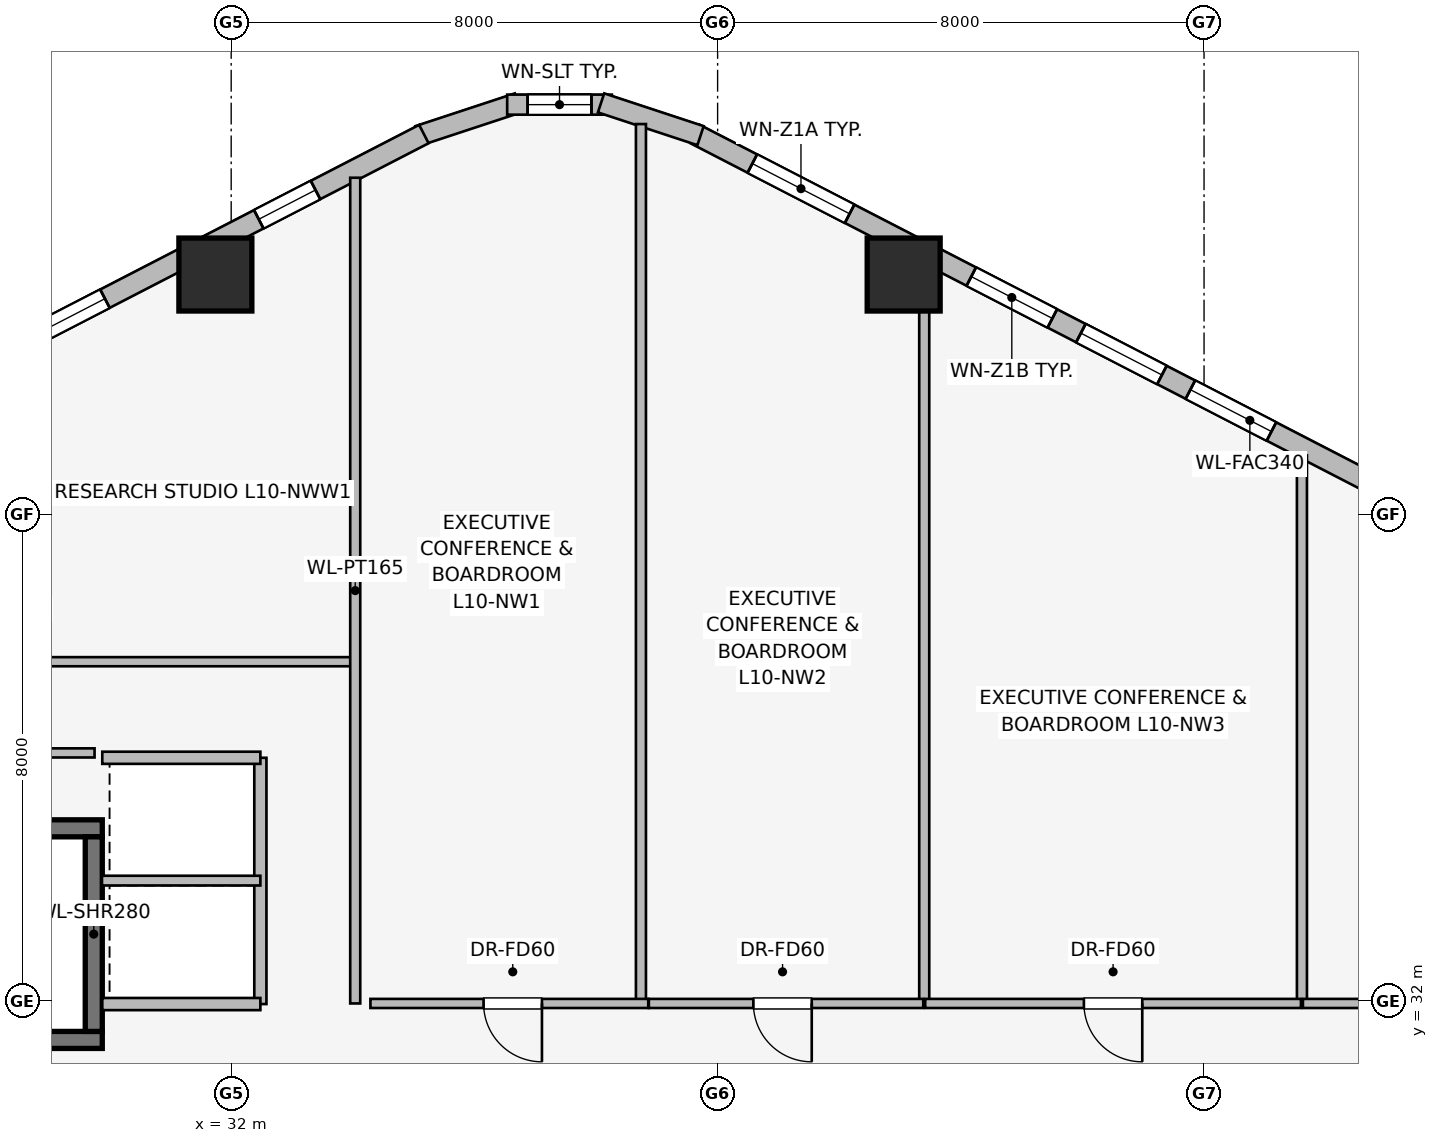
"""IFC4 building model, lengths in metres.
Left out: names, types, materials, properties, quantities, classifications, styles, units other than length and angle.
Written with IfcOpenShell. Run it as: python <this file> out.ifc"""

import sys

from ifc_helpers import new_model, si_unit, direction, frame, frame_2d, origin, origin_2d, place, context, subcontext, project, spatial, rectangle, extrude, element, fill, save


model = new_model("IFC4")
c1 = context("Model", 3, precision=1e-05, world=origin(), true_north=direction((0.0, 1.0)))
c2 = subcontext(c1, "Body", "Model", "MODEL_VIEW")
j1 = project(units=[si_unit("LENGTHUNIT", "METRE"), si_unit("PLANEANGLEUNIT", "RADIAN")], contexts=[c1])
p1 = place(None, origin())
s1 = spatial("IfcSite", under=j1, at=p1, CompositionType="ELEMENT")
p2 = place(p1, origin())
s2 = spatial("IfcBuilding", under=s1, at=p2, CompositionType="ELEMENT")
p3 = place(p2, frame((0.0, 0.0, 41.6)))
s3 = spatial("IfcBuildingStorey", under=s2, at=p3, CompositionType="ELEMENT", Elevation=41.6)
p4 = place(p3, frame((21.52, 31.36, 0.0), z_axis=(0.0, 0.0, 1.0), x_axis=(1.0, 0.0, 0.0)))
e1 = element("IfcWall", 1, at=p4, inside=s3, PredefinedType="SHEAR", context=c2, shape_type="SweptSolid", body=[
    extrude(rectangle(XDim=8.36, YDim=0.28, at=frame_2d((4.18, 0.0))), origin(), (0.0, 0.0, 1.0), 3.65),
])
p5 = place(p4, frame((0.45, 0.0, 0.0)))
e2 = element("IfcOpeningElement", 2, at=p5, cuts=e1, PredefinedType="OPENING", context=c2, shape_type="SweptSolid", body=[
    extrude(rectangle(XDim=1.05, YDim=2.0, at=frame_2d((0.525, 1.0))), frame((0.0, 0.15, 0.0), z_axis=(0.0, -1.0, 0.0), x_axis=(1.0, 0.0, 0.0)), (0.0, 0.0, 1.0), 0.3),
])
p6 = place(p3, frame((29.88, 34.84, 0.0), z_axis=(0.0, 0.0, 1.0), x_axis=(-1.0, 0.0, 0.0)))
e3 = element("IfcWall", 3, at=p6, inside=s3, PredefinedType="SHEAR", context=c2, shape_type="SweptSolid", body=[
    extrude(rectangle(XDim=8.36, YDim=0.28, at=frame_2d((4.18, 0.0))), origin(), (0.0, 0.0, 1.0), 3.65),
])
p7 = place(p3, frame((29.74, 31.5, 0.0), z_axis=(0.0, 0.0, 1.0), x_axis=(0.0, 1.0, 0.0)))
e4 = element("IfcWall", 4, at=p7, inside=s3, PredefinedType="SHEAR", context=c2, shape_type="SweptSolid", body=[
    extrude(rectangle(XDim=3.2, YDim=0.28, at=frame_2d((1.6, 0.0))), origin(), (0.0, 0.0, 1.0), 3.65),
])
for number, where, z_axis, x_axis in (
    (5, (43.06, 43.947, 0.0), (0.0, 0.0, 1.0), (1.0, 0.0, 0.0)),
    (6, (31.74, 43.947, 0.0), (0.0, 0.0, 1.0), (1.0, 0.0, 0.0)),
):
    element("IfcColumn", number, at=place(p3, frame(where, z_axis=z_axis, x_axis=x_axis)), inside=s3, PredefinedType="COLUMN", context=c2, shape_type="SweptSolid", body=[
        extrude(rectangle(XDim=1.2, YDim=1.2, at=origin_2d()), origin(), (0.0, 0.0, 1.0), 3.65),
    ])
p8 = place(p3, frame((39.631, 46.257, 0.0), z_axis=(0.0, 0.0, 1.0), x_axis=(0.888634413993, -0.458616264721, 0.0)))
e7 = element("IfcWall", 7, at=p8, inside=s3, PredefinedType="STANDARD", context=c2, shape_type="SweptSolid", body=[
    extrude(rectangle(XDim=20.531, YDim=0.34, at=frame_2d((10.266, 0.0))), origin(), (0.0, 0.0, 1.0), 2.684),
])
p9 = place(p8, frame((1.058, 0.0, 0.75)))
e8 = element("IfcOpeningElement", 8, at=p9, cuts=e7, PredefinedType="OPENING", context=c2, shape_type="SweptSolid", body=[
    extrude(rectangle(XDim=1.8, YDim=1.5, at=frame_2d((0.9, 0.75))), frame((0.0, 0.18, 0.0), z_axis=(0.0, -1.0, 0.0), x_axis=(1.0, 0.0, 0.0)), (0.0, 0.0, 1.0), 0.36),
])
p10 = place(p8, frame((5.11, 0.0, 0.75)))
e9 = element("IfcOpeningElement", 9, at=p10, cuts=e7, PredefinedType="OPENING", context=c2, shape_type="SweptSolid", body=[
    extrude(rectangle(XDim=1.5, YDim=1.5, at=frame_2d((0.75, 0.75))), frame((0.0, 0.18, 0.0), z_axis=(0.0, -1.0, 0.0), x_axis=(1.0, 0.0, 0.0)), (0.0, 0.0, 1.0), 0.36),
])
p11 = place(p8, frame((7.138, 0.0, 0.75)))
e10 = element("IfcOpeningElement", 10, at=p11, cuts=e7, PredefinedType="OPENING", context=c2, shape_type="SweptSolid", body=[
    extrude(rectangle(XDim=1.5, YDim=1.5, at=frame_2d((0.75, 0.75))), frame((0.0, 0.18, 0.0), z_axis=(0.0, -1.0, 0.0), x_axis=(1.0, 0.0, 0.0)), (0.0, 0.0, 1.0), 0.36),
])
p12 = place(p8, frame((9.165, 0.0, 0.75)))
e11 = element("IfcOpeningElement", 11, at=p12, cuts=e7, PredefinedType="OPENING", context=c2, shape_type="SweptSolid", body=[
    extrude(rectangle(XDim=1.5, YDim=1.5, at=frame_2d((0.75, 0.75))), frame((0.0, 0.18, 0.0), z_axis=(0.0, -1.0, 0.0), x_axis=(1.0, 0.0, 0.0)), (0.0, 0.0, 1.0), 0.36),
])
p13 = place(p8, frame((12.77, 0.0, 0.75)))
e12 = element("IfcOpeningElement", 12, at=p13, cuts=e7, PredefinedType="OPENING", context=c2, shape_type="SweptSolid", body=[
    extrude(rectangle(XDim=1.8, YDim=1.5, at=frame_2d((0.9, 0.75))), frame((0.0, 0.18, 0.0), z_axis=(0.0, -1.0, 0.0), x_axis=(1.0, 0.0, 0.0)), (0.0, 0.0, 1.0), 0.36),
])
p14 = place(p8, frame((17.98, 0.0, 0.75)))
e13 = element("IfcOpeningElement", 13, at=p14, cuts=e7, PredefinedType="OPENING", context=c2, shape_type="SweptSolid", body=[
    extrude(rectangle(XDim=1.5, YDim=1.5, at=frame_2d((0.75, 0.75))), frame((0.0, 0.18, 0.0), z_axis=(0.0, -1.0, 0.0), x_axis=(1.0, 0.0, 0.0)), (0.0, 0.0, 1.0), 0.36),
])
p15 = place(p3, frame((35.081, 46.231, 0.0), z_axis=(0.0, 0.0, 1.0), x_axis=(0.94976901097, 0.312951794691, 0.0)))
e14 = element("IfcWall", 14, at=p15, inside=s3, PredefinedType="STANDARD", context=c2, shape_type="SweptSolid", body=[
    extrude(rectangle(XDim=1.722, YDim=0.33, at=frame_2d((0.861, 0.0))), origin(), (0.0, 0.0, 1.0), 3.39),
])
p16 = place(p3, frame((36.539, 46.741, 0.0), z_axis=(0.0, 0.0, 1.0), x_axis=(1.0, 0.0, 0.0)))
e15 = element("IfcWall", 15, at=p16, inside=s3, PredefinedType="STANDARD", context=c2, shape_type="SweptSolid", body=[
    extrude(rectangle(XDim=1.722, YDim=0.33, at=frame_2d((0.861, 0.0))), origin(), (0.0, 0.0, 1.0), 3.39),
])
p17 = place(p16, frame((0.336, 0.0, 0.75)))
e16 = element("IfcOpeningElement", 16, at=p17, cuts=e15, PredefinedType="OPENING", context=c2, shape_type="SweptSolid", body=[
    extrude(rectangle(XDim=1.05, YDim=1.4, at=frame_2d((0.525, 0.7))), frame((0.0, 0.175, 0.0), z_axis=(0.0, -1.0, 0.0), x_axis=(1.0, 0.0, 0.0)), (0.0, 0.0, 1.0), 0.35),
])
p18 = place(p3, frame((38.083, 46.77, 0.0), z_axis=(0.0, 0.0, 1.0), x_axis=(0.94976901097, -0.312951794691, 0.0)))
e17 = element("IfcWall", 17, at=p18, inside=s3, PredefinedType="STANDARD", context=c2, shape_type="SweptSolid", body=[
    extrude(rectangle(XDim=1.722, YDim=0.33, at=frame_2d((0.861, 0.0))), origin(), (0.0, 0.0, 1.0), 3.39),
])
p19 = place(p3, frame((16.924, 36.841, 0.0), z_axis=(0.0, 0.0, 1.0), x_axis=(0.888634413993, 0.458616264721, 0.0)))
e18 = element("IfcWall", 18, at=p19, inside=s3, PredefinedType="STANDARD", context=c2, shape_type="SweptSolid", body=[
    extrude(rectangle(XDim=20.531, YDim=0.34, at=frame_2d((10.266, 0.0))), origin(), (0.0, 0.0, 1.0), 2.684),
])
p20 = place(p19, frame((2.161, 0.0, 0.75)))
e19 = element("IfcOpeningElement", 19, at=p20, cuts=e18, PredefinedType="OPENING", context=c2, shape_type="SweptSolid", body=[
    extrude(rectangle(XDim=1.05, YDim=1.4, at=frame_2d((0.525, 0.7))), frame((0.0, 0.18, 0.0), z_axis=(0.0, -1.0, 0.0), x_axis=(1.0, 0.0, 0.0)), (0.0, 0.0, 1.0), 0.36),
])
p21 = place(p19, frame((5.903, 0.0, 0.75)))
e20 = element("IfcOpeningElement", 20, at=p21, cuts=e18, PredefinedType="OPENING", context=c2, shape_type="SweptSolid", body=[
    extrude(rectangle(XDim=1.5, YDim=1.5, at=frame_2d((0.75, 0.75))), frame((0.0, 0.18, 0.0), z_axis=(0.0, -1.0, 0.0), x_axis=(1.0, 0.0, 0.0)), (0.0, 0.0, 1.0), 0.36),
])
p22 = place(p19, frame((9.516, 0.0, 0.75)))
e21 = element("IfcOpeningElement", 21, at=p22, cuts=e18, PredefinedType="OPENING", context=c2, shape_type="SweptSolid", body=[
    extrude(rectangle(XDim=1.5, YDim=1.5, at=frame_2d((0.75, 0.75))), frame((0.0, 0.18, 0.0), z_axis=(0.0, -1.0, 0.0), x_axis=(1.0, 0.0, 0.0)), (0.0, 0.0, 1.0), 0.36),
])
p23 = place(p19, frame((13.129, 0.0, 0.75)))
e22 = element("IfcOpeningElement", 22, at=p23, cuts=e18, PredefinedType="OPENING", context=c2, shape_type="SweptSolid", body=[
    extrude(rectangle(XDim=1.5, YDim=1.5, at=frame_2d((0.75, 0.75))), frame((0.0, 0.18, 0.0), z_axis=(0.0, -1.0, 0.0), x_axis=(1.0, 0.0, 0.0)), (0.0, 0.0, 1.0), 0.36),
])
p24 = place(p19, frame((17.476, 0.0, 0.75)))
e23 = element("IfcOpeningElement", 23, at=p24, cuts=e18, PredefinedType="OPENING", context=c2, shape_type="SweptSolid", body=[
    extrude(rectangle(XDim=1.05, YDim=1.4, at=frame_2d((0.525, 0.7))), frame((0.0, 0.18, 0.0), z_axis=(0.0, -1.0, 0.0), x_axis=(1.0, 0.0, 0.0)), (0.0, 0.0, 1.0), 0.36),
])
p25 = place(p3, frame((32.48, 31.95, 0.0), z_axis=(0.0, 0.0, 1.0), x_axis=(0.0, 1.0, 0.0)))
e24 = element("IfcWall", 24, at=p25, inside=s3, PredefinedType="PARTITIONING", context=c2, shape_type="SweptSolid", body=[
    extrude(rectangle(XDim=4.05, YDim=0.2, at=frame_2d((2.025, 0.0))), origin(), (0.0, 0.0, 1.0), 2.513),
])
for number, where, z_axis, x_axis in (
    (25, (29.88, 36.0, 0.0), (0.0, 0.0, 1.0), (1.0, 0.0, 0.0)),
    (26, (32.48, 31.95, 0.0), (0.0, 0.0, 1.0), (-1.0, 0.0, 0.0)),
):
    element("IfcWall", number, at=place(p3, frame(where, z_axis=z_axis, x_axis=x_axis)), inside=s3, PredefinedType="PARTITIONING", context=c2, shape_type="SweptSolid", body=[
        extrude(rectangle(XDim=2.6, YDim=0.2, at=frame_2d((1.3, 0.0))), origin(), (0.0, 0.0, 1.0), 3.39),
    ])
p26 = place(p3, frame((29.875, 33.98, 0.0), z_axis=(0.0, 0.0, 1.0), x_axis=(1.0, 0.0, 0.0)))
e27 = element("IfcWall", 27, at=p26, inside=s3, PredefinedType="PARTITIONING", context=c2, shape_type="SweptSolid", body=[
    extrude(rectangle(XDim=2.605, YDim=0.16, at=frame_2d((1.302, 0.0))), origin(), (0.0, 0.0, 1.0), 3.39),
])
p27 = place(p3, frame((34.0, 37.58, 0.0), z_axis=(0.0, 0.0, 1.0), x_axis=(-1.0, 0.0, 0.0)))
e28 = element("IfcWall", 28, at=p27, inside=s3, PredefinedType="PARTITIONING", context=c2, shape_type="SweptSolid", body=[
    extrude(rectangle(XDim=15.6, YDim=0.15, at=frame_2d((7.8, 0.0))), origin(), (0.0, 0.0, 1.0), 3.39),
])
p28 = place(p27, frame((5.195, 0.0, 0.0)))
e29 = element("IfcOpeningElement", 29, at=p28, cuts=e28, PredefinedType="OPENING", context=c2, shape_type="SweptSolid", body=[
    extrude(rectangle(XDim=0.96, YDim=2.0, at=frame_2d((0.48, 1.0))), frame((0.0, 0.085, 0.0), z_axis=(0.0, -1.0, 0.0), x_axis=(1.0, 0.0, 0.0)), (0.0, 0.0, 1.0), 0.17),
])
p29 = place(p3, frame((34.04, 31.96, 0.0), z_axis=(0.0, 0.0, 1.0), x_axis=(0.0, 1.0, 0.0)))
e30 = element("IfcWall", 30, at=p29, inside=s3, PredefinedType="PARTITIONING", context=c2, shape_type="SweptSolid", body=[
    extrude(rectangle(XDim=13.579, YDim=0.165, at=frame_2d((6.79, 0.0))), origin(), (0.0, 0.0, 1.0), 3.39),
])
p30 = place(p3, frame((38.739, 31.97, 0.0), z_axis=(0.0, 0.0, 1.0), x_axis=(0.0, 1.0, 0.0)))
e31 = element("IfcWall", 31, at=p30, inside=s3, PredefinedType="PARTITIONING", context=c2, shape_type="SweptSolid", body=[
    extrude(rectangle(XDim=14.452, YDim=0.165, at=frame_2d((7.226, 0.0))), origin(), (0.0, 0.0, 1.0), 3.39),
])
p31 = place(p3, frame((43.398, 31.97, 0.0), z_axis=(0.0, 0.0, 1.0), x_axis=(0.0, 1.0, 0.0)))
e32 = element("IfcWall", 32, at=p31, inside=s3, PredefinedType="PARTITIONING", context=c2, shape_type="SweptSolid", body=[
    extrude(rectangle(XDim=12.208, YDim=0.165, at=frame_2d((6.104, 0.0))), origin(), (0.0, 0.0, 1.0), 2.513),
])
p32 = place(p3, frame((49.61, 31.97, 0.0), z_axis=(0.0, 0.0, 1.0), x_axis=(0.0, 1.0, 0.0)))
e33 = element("IfcWall", 33, at=p32, inside=s3, PredefinedType="PARTITIONING", context=c2, shape_type="SweptSolid", body=[
    extrude(rectangle(XDim=9.002, YDim=0.165, at=frame_2d((4.501, 0.0))), origin(), (0.0, 0.0, 1.0), 3.39),
])
p33 = place(p3, frame((38.859, 31.96, 0.0), z_axis=(0.0, 0.0, 1.0), x_axis=(-1.0, 0.0, 0.0)))
e34 = element("IfcWall", 34, at=p33, inside=s3, PredefinedType="PARTITIONING", context=c2, shape_type="SweptSolid", body=[
    extrude(rectangle(XDim=4.569, YDim=0.15, at=frame_2d((2.284, 0.0))), origin(), (0.0, 0.0, 1.0), 3.39),
])
p34 = place(p33, frame((1.748, 0.0, 0.0)))
e35 = element("IfcOpeningElement", 35, at=p34, cuts=e34, PredefinedType="OPENING", context=c2, shape_type="SweptSolid", body=[
    extrude(rectangle(XDim=0.96, YDim=2.0, at=frame_2d((0.48, 1.0))), frame((0.0, 0.085, 0.0), z_axis=(0.0, -1.0, 0.0), x_axis=(1.0, 0.0, 0.0)), (0.0, 0.0, 1.0), 0.17),
])
p35 = place(p3, frame((43.382, 31.96, 0.0), z_axis=(0.0, 0.0, 1.0), x_axis=(-1.0, 0.0, 0.0)))
e36 = element("IfcWall", 36, at=p35, inside=s3, PredefinedType="PARTITIONING", context=c2, shape_type="SweptSolid", body=[
    extrude(rectangle(XDim=4.513, YDim=0.15, at=frame_2d((2.257, 0.0))), origin(), (0.0, 0.0, 1.0), 3.39),
])
p36 = place(p35, frame((1.834, 0.0, 0.0)))
e37 = element("IfcOpeningElement", 37, at=p36, cuts=e36, PredefinedType="OPENING", context=c2, shape_type="SweptSolid", body=[
    extrude(rectangle(XDim=0.96, YDim=2.0, at=frame_2d((0.48, 1.0))), frame((0.0, 0.085, 0.0), z_axis=(0.0, -1.0, 0.0), x_axis=(1.0, 0.0, 0.0)), (0.0, 0.0, 1.0), 0.17),
])
p37 = place(p3, frame((49.594, 31.96, 0.0), z_axis=(0.0, 0.0, 1.0), x_axis=(-1.0, 0.0, 0.0)))
e38 = element("IfcWall", 38, at=p37, inside=s3, PredefinedType="PARTITIONING", context=c2, shape_type="SweptSolid", body=[
    extrude(rectangle(XDim=6.18, YDim=0.15, at=frame_2d((3.09, 0.0))), origin(), (0.0, 0.0, 1.0), 3.39),
])
p38 = place(p37, frame((2.61, 0.0, 0.0)))
e39 = element("IfcOpeningElement", 39, at=p38, cuts=e38, PredefinedType="OPENING", context=c2, shape_type="SweptSolid", body=[
    extrude(rectangle(XDim=0.96, YDim=2.0, at=frame_2d((0.48, 1.0))), frame((0.0, 0.085, 0.0), z_axis=(0.0, -1.0, 0.0), x_axis=(1.0, 0.0, 0.0)), (0.0, 0.0, 1.0), 0.17),
])
p39 = place(p3, frame((54.656, 31.96, 0.0), z_axis=(0.0, 0.0, 1.0), x_axis=(-1.0, 0.0, 0.0)))
e40 = element("IfcWall", 40, at=p39, inside=s3, PredefinedType="PARTITIONING", context=c2, shape_type="SweptSolid", body=[
    extrude(rectangle(XDim=5.03, YDim=0.15, at=frame_2d((2.515, 0.0))), origin(), (0.0, 0.0, 1.0), 3.39),
])
p40 = place(p39, frame((1.978, 0.0, 0.0)))
e41 = element("IfcOpeningElement", 41, at=p40, cuts=e40, PredefinedType="OPENING", context=c2, shape_type="SweptSolid", body=[
    extrude(rectangle(XDim=0.96, YDim=2.0, at=frame_2d((0.48, 1.0))), frame((0.0, 0.085, 0.0), z_axis=(0.0, -1.0, 0.0), x_axis=(1.0, 0.0, 0.0)), (0.0, 0.0, 1.0), 0.17),
])
p41 = place(p3, frame((29.753, 36.08, 0.0), z_axis=(0.0, 0.0, 1.0), x_axis=(-1.0, 0.0, 0.0)))
e42 = element("IfcWall", 42, at=p41, inside=s3, PredefinedType="PARTITIONING", context=c2, shape_type="SweptSolid", body=[
    extrude(rectangle(XDim=7.353, YDim=0.15, at=frame_2d((3.677, 0.0))), origin(), (0.0, 0.0, 1.0), 3.39),
])
p42 = place(p9, origin())
e43 = element("IfcWindow", 43, at=p42, inside=s3, PartitioningType="SINGLE_PANEL", PredefinedType="WINDOW", context=c2, shape_type="SweptSolid", body=[
    extrude(rectangle(XDim=1.8, YDim=1.5, at=frame_2d((0.9, 0.75))), frame((0.0, 0.03, 0.0), z_axis=(0.0, -1.0, 0.0), x_axis=(1.0, 0.0, 0.0)), (0.0, 0.0, 1.0), 0.06),
])
fill(e8, e43)
p43 = place(p10, origin())
e44 = element("IfcWindow", 44, at=p43, inside=s3, PartitioningType="SINGLE_PANEL", PredefinedType="WINDOW", context=c2, shape_type="SweptSolid", body=[
    extrude(rectangle(XDim=1.5, YDim=1.5, at=frame_2d((0.75, 0.75))), frame((0.0, 0.03, 0.0), z_axis=(0.0, -1.0, 0.0), x_axis=(1.0, 0.0, 0.0)), (0.0, 0.0, 1.0), 0.06),
])
fill(e9, e44)
p44 = place(p11, origin())
e45 = element("IfcWindow", 45, at=p44, inside=s3, PartitioningType="SINGLE_PANEL", PredefinedType="WINDOW", context=c2, shape_type="SweptSolid", body=[
    extrude(rectangle(XDim=1.5, YDim=1.5, at=frame_2d((0.75, 0.75))), frame((0.0, 0.03, 0.0), z_axis=(0.0, -1.0, 0.0), x_axis=(1.0, 0.0, 0.0)), (0.0, 0.0, 1.0), 0.06),
])
fill(e10, e45)
p45 = place(p12, origin())
e46 = element("IfcWindow", 46, at=p45, inside=s3, PartitioningType="SINGLE_PANEL", PredefinedType="WINDOW", context=c2, shape_type="SweptSolid", body=[
    extrude(rectangle(XDim=1.5, YDim=1.5, at=frame_2d((0.75, 0.75))), frame((0.0, 0.03, 0.0), z_axis=(0.0, -1.0, 0.0), x_axis=(1.0, 0.0, 0.0)), (0.0, 0.0, 1.0), 0.06),
])
fill(e11, e46)
p46 = place(p17, origin())
e47 = element("IfcWindow", 47, at=p46, inside=s3, PartitioningType="SINGLE_PANEL", PredefinedType="WINDOW", context=c2, shape_type="SweptSolid", body=[
    extrude(rectangle(XDim=1.05, YDim=1.4, at=frame_2d((0.525, 0.7))), frame((0.0, 0.03, 0.0), z_axis=(0.0, -1.0, 0.0), x_axis=(1.0, 0.0, 0.0)), (0.0, 0.0, 1.0), 0.06),
])
fill(e16, e47)
p47 = place(p23, origin())
e48 = element("IfcWindow", 48, at=p47, inside=s3, PartitioningType="SINGLE_PANEL", PredefinedType="WINDOW", context=c2, shape_type="SweptSolid", body=[
    extrude(rectangle(XDim=1.5, YDim=1.5, at=frame_2d((0.75, 0.75))), frame((0.0, 0.03, 0.0), z_axis=(0.0, -1.0, 0.0), x_axis=(1.0, 0.0, 0.0)), (0.0, 0.0, 1.0), 0.06),
])
fill(e22, e48)
p48 = place(p24, origin())
e49 = element("IfcWindow", 49, at=p48, inside=s3, PartitioningType="SINGLE_PANEL", PredefinedType="WINDOW", context=c2, shape_type="SweptSolid", body=[
    extrude(rectangle(XDim=1.05, YDim=1.4, at=frame_2d((0.525, 0.7))), frame((0.0, 0.03, 0.0), z_axis=(0.0, -1.0, 0.0), x_axis=(1.0, 0.0, 0.0)), (0.0, 0.0, 1.0), 0.06),
])
fill(e23, e49)
p49 = place(p34, origin())
e50 = element("IfcDoor", 50, at=p49, inside=s3, OperationType="SINGLE_SWING_LEFT", PredefinedType="DOOR", context=c2, shape_type="SweptSolid", body=[
    extrude(rectangle(XDim=0.96, YDim=2.0, at=frame_2d((0.48, 1.0))), frame((0.0, 0.025, 0.0), z_axis=(0.0, -1.0, 0.0), x_axis=(1.0, 0.0, 0.0)), (0.0, 0.0, 1.0), 0.05),
])
fill(e35, e50)
p50 = place(p36, origin())
e51 = element("IfcDoor", 51, at=p50, inside=s3, OperationType="SINGLE_SWING_LEFT", PredefinedType="DOOR", context=c2, shape_type="SweptSolid", body=[
    extrude(rectangle(XDim=0.96, YDim=2.0, at=frame_2d((0.48, 1.0))), frame((0.0, 0.025, 0.0), z_axis=(0.0, -1.0, 0.0), x_axis=(1.0, 0.0, 0.0)), (0.0, 0.0, 1.0), 0.05),
])
fill(e37, e51)
p51 = place(p38, origin())
e52 = element("IfcDoor", 52, at=p51, inside=s3, OperationType="SINGLE_SWING_LEFT", PredefinedType="DOOR", context=c2, shape_type="SweptSolid", body=[
    extrude(rectangle(XDim=0.96, YDim=2.0, at=frame_2d((0.48, 1.0))), frame((0.0, 0.025, 0.0), z_axis=(0.0, -1.0, 0.0), x_axis=(1.0, 0.0, 0.0)), (0.0, 0.0, 1.0), 0.05),
])
fill(e39, e52)
save(model, sys.argv[1])
